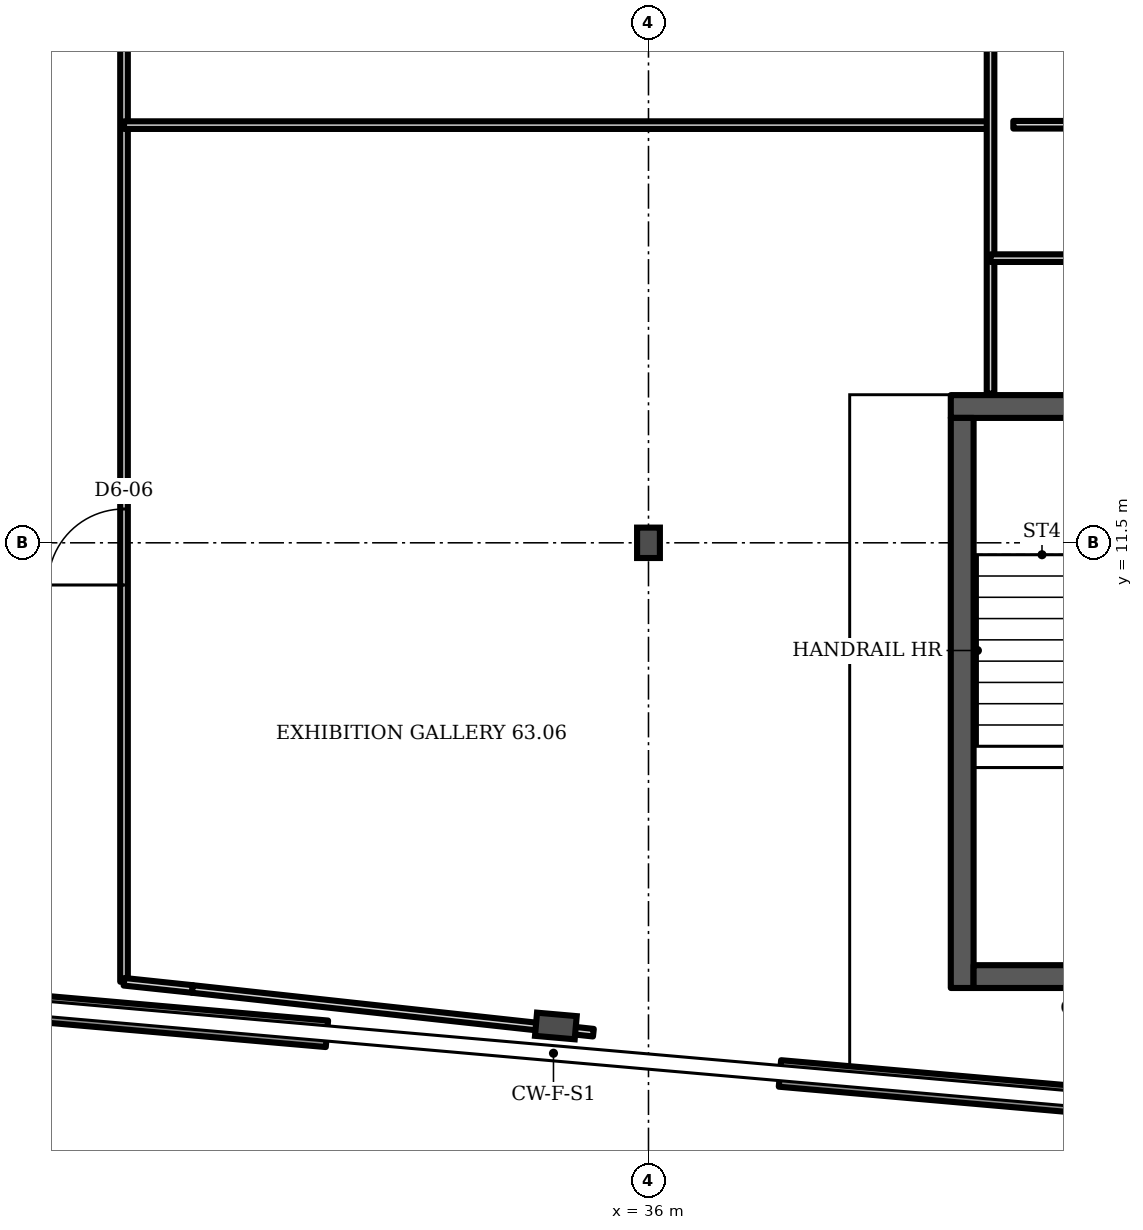
"""IFC4 building model, lengths in metres.
Left out: names, types, materials, properties, quantities, classifications, styles, units other than length and angle.
Written with IfcOpenShell. Run it as: python <this file> out.ifc"""

import sys

from ifc_helpers import new_model, si_unit, direction, frame, frame_2d, origin, origin_2d, place, context, subcontext, project, spatial, rectangle, i_section, extrude, element, fill, save


model = new_model("IFC4")
c1 = context("Model", 3, precision=1e-05, world=origin(), true_north=direction((0.0, 1.0)))
c2 = subcontext(c1, "Body", "Model", "MODEL_VIEW")
j1 = project(units=[si_unit("LENGTHUNIT", "METRE"), si_unit("PLANEANGLEUNIT", "RADIAN")], contexts=[c1])
p1 = place(None, origin())
s1 = spatial("IfcSite", under=j1, at=p1, CompositionType="ELEMENT")
p2 = place(p1, origin())
s2 = spatial("IfcBuilding", under=s1, at=p2, CompositionType="ELEMENT")
p3 = place(p2, frame((0.0, 0.0, 250.3)))
s3 = spatial("IfcBuildingStorey", under=s2, at=p3, CompositionType="ELEMENT", Elevation=250.3)
p4 = place(p3, frame((34.781, 5.143, 0.0), z_axis=(0.0, 0.0, 1.0), x_axis=(-0.087156, -0.996197, 0.0)))
e1 = element("IfcColumn", 1, at=p4, inside=s3, PredefinedType="COLUMN", context=c2, shape_type="SweptSolid", body=[
    extrude(i_section(OverallWidth=0.306, OverallDepth=0.524, WebThickness=0.021, FlangeThickness=0.04, FilletRadius=0.027, at=origin_2d()), origin(), (0.0, 0.0, 1.0), 3.6),
])
p5 = place(p3, frame((36.0, 11.5, 0.0), z_axis=(0.0, 0.0, 1.0), x_axis=(1.0, 0.0, 0.0)))
e2 = element("IfcColumn", 2, at=p5, inside=s3, PredefinedType="COLUMN", context=c2, shape_type="SweptSolid", body=[
    extrude(i_section(OverallWidth=0.3, OverallDepth=0.4, WebThickness=0.013, FlangeThickness=0.024, FilletRadius=0.027, at=origin_2d()), origin(), (0.0, 0.0, 1.0), 3.6),
])
p6 = place(p3, frame((25.929, 5.551, 0.0), z_axis=(0.0, 0.0, 1.0), x_axis=(0.996198, -0.08716, 0.0)))
e3 = element("IfcWall", 3, at=p6, inside=s3, PredefinedType="SOLIDWALL", context=c2, shape_type="SweptSolid", body=[
    extrude(rectangle(XDim=5.863, YDim=0.35, at=frame_2d((2.931, 0.0))), origin(), (0.0, 0.0, 1.0), 1.0),
])
p7 = place(p3, frame((37.729, 4.519, 0.0), z_axis=(0.0, 0.0, 1.0), x_axis=(0.99619, -0.087167, 0.0)))
e4 = element("IfcWall", 4, at=p7, inside=s3, PredefinedType="SOLIDWALL", context=c2, shape_type="SweptSolid", body=[
    extrude(rectangle(XDim=11.831, YDim=0.35, at=frame_2d((5.915, 0.0))), origin(), (0.0, 0.0, 1.0), 1.0),
])
p8 = place(p3, frame((39.977, 13.293, 0.0), z_axis=(0.0, 0.0, 1.0), x_axis=(1.0, 0.0, 0.0)))
e5 = element("IfcWall", 5, at=p8, inside=s3, PredefinedType="SHEAR", context=c2, shape_type="SweptSolid", body=[
    extrude(rectangle(XDim=4.35, YDim=0.3, at=frame_2d((2.175, 0.0))), origin(), (0.0, 0.0, 1.0), 3.2),
])
p9 = place(p8, frame((1.575, 0.0, 0.0)))
e6 = element("IfcOpeningElement", 6, at=p9, cuts=e5, PredefinedType="OPENING", context=c2, shape_type="SweptSolid", body=[
    extrude(rectangle(XDim=1.2, YDim=2.1, at=frame_2d((0.6, 1.05))), frame((0.0, 0.16, 0.0), z_axis=(0.0, -1.0, 0.0), x_axis=(1.0, 0.0, 0.0)), (0.0, 0.0, 1.0), 0.32),
])
p10 = place(p3, frame((29.1, 5.725, 0.0), z_axis=(0.0, 0.0, 1.0), x_axis=(0.0, 1.0, 0.0)))
e7 = element("IfcWall", 7, at=p10, inside=s3, PredefinedType="PARTITIONING", context=c2, shape_type="SweptSolid", body=[
    extrude(rectangle(XDim=24.775, YDim=0.1, at=frame_2d((12.387, 0.0))), origin(), (0.0, 0.0, 1.0), 3.2),
])
p11 = place(p10, frame((5.22, 0.0, 0.0)))
e8 = element("IfcOpeningElement", 8, at=p11, cuts=e7, PredefinedType="OPENING", context=c2, shape_type="SweptSolid", body=[
    extrude(rectangle(XDim=1.0, YDim=2.1, at=frame_2d((0.5, 1.05))), frame((0.0, 0.06, 0.0), z_axis=(0.0, -1.0, 0.0), x_axis=(1.0, 0.0, 0.0)), (0.0, 0.0, 1.0), 0.12),
])
p12 = place(p10, frame((17.095, 0.0, 0.0)))
e9 = element("IfcOpeningElement", 9, at=p12, cuts=e7, PredefinedType="OPENING", context=c2, shape_type="SweptSolid", body=[
    extrude(rectangle(XDim=1.8, YDim=2.1, at=frame_2d((0.9, 1.05))), frame((0.0, 0.06, 0.0), z_axis=(0.0, -1.0, 0.0), x_axis=(1.0, 0.0, 0.0)), (0.0, 0.0, 1.0), 0.12),
])
p13 = place(p3, frame((29.1, 16.995, 0.0), z_axis=(0.0, 0.0, 1.0), x_axis=(1.0, 0.0, 0.0)))
e10 = element("IfcWall", 10, at=p13, inside=s3, PredefinedType="PARTITIONING", context=c2, shape_type="SweptSolid", body=[
    extrude(rectangle(XDim=11.4, YDim=0.1, at=frame_2d((5.7, 0.0))), origin(), (0.0, 0.0, 1.0), 3.2),
])
p14 = place(p3, frame((30.0, 5.63, 0.0), z_axis=(0.0, 0.0, 1.0), x_axis=(-0.994445, 0.105218, 0.0)))
e11 = element("IfcWall", 11, at=p14, inside=s3, PredefinedType="PARTITIONING", context=c2, shape_type="SweptSolid", body=[
    extrude(rectangle(XDim=0.905, YDim=0.1, at=frame_2d((0.453, 0.0))), origin(), (0.0, 0.0, 1.0), 2.58),
])
p15 = place(p3, frame((35.275, 5.055, 0.0), z_axis=(0.0, 0.0, 1.0), x_axis=(-0.994115, 0.108356, 0.0)))
e12 = element("IfcWall", 12, at=p15, inside=s3, PredefinedType="PARTITIONING", context=c2, shape_type="SweptSolid", body=[
    extrude(rectangle(XDim=5.306, YDim=0.1, at=frame_2d((2.653, 0.0))), origin(), (0.0, 0.0, 1.0), 2.58),
])
p16 = place(p3, frame((40.5, 13.463, 0.0), z_axis=(0.0, 0.0, 1.0), x_axis=(0.0, 1.0, 0.0)))
e13 = element("IfcWall", 13, at=p16, inside=s3, PredefinedType="PARTITIONING", context=c2, shape_type="SweptSolid", body=[
    extrude(rectangle(XDim=17.037, YDim=0.1, at=frame_2d((8.519, 0.0))), origin(), (0.0, 0.0, 1.0), 3.2),
])
p17 = place(p3, frame((40.5, 15.245, 0.0), z_axis=(0.0, 0.0, 1.0), x_axis=(1.0, 0.0, 0.0)))
e14 = element("IfcWall", 14, at=p17, inside=s3, PredefinedType="PARTITIONING", context=c2, shape_type="SweptSolid", body=[
    extrude(rectangle(XDim=9.52, YDim=0.1, at=frame_2d((4.76, 0.0))), origin(), (0.0, 0.0, 1.0), 3.2),
])
p18 = place(p17, frame((8.125, 0.0, 0.0)))
e15 = element("IfcOpeningElement", 15, at=p18, cuts=e14, PredefinedType="OPENING", context=c2, shape_type="SweptSolid", body=[
    extrude(rectangle(XDim=1.0, YDim=2.1, at=frame_2d((0.5, 1.05))), frame((0.0, 0.06, 0.0), z_axis=(0.0, -1.0, 0.0), x_axis=(1.0, 0.0, 0.0)), (0.0, 0.0, 1.0), 0.12),
])
p19 = place(p3, frame((40.8, 17.0, 0.0), z_axis=(0.0, 0.0, 1.0), x_axis=(1.0, 0.0, 0.0)))
e16 = element("IfcWall", 16, at=p19, inside=s3, PredefinedType="PARTITIONING", context=c2, shape_type="SweptSolid", body=[
    extrude(rectangle(XDim=1.325, YDim=0.1, at=frame_2d((0.663, 0.0))), origin(), (0.0, 0.0, 1.0), 3.2),
])
p20 = place(p3, frame((40.127, 5.643, 0.0), z_axis=(0.0, 0.0, 1.0), x_axis=(0.0, 1.0, 0.0)))
e17 = element("IfcWall", 17, at=p20, inside=s3, PredefinedType="SHEAR", context=c2, shape_type="SweptSolid", body=[
    extrude(rectangle(XDim=7.5, YDim=0.3, at=frame_2d((3.75, 0.0))), origin(), (0.0, 0.0, 1.0), 3.2),
])
p21 = place(p3, frame((40.277, 5.793, 0.0), z_axis=(0.0, 0.0, 1.0), x_axis=(1.0, 0.0, 0.0)))
e18 = element("IfcWall", 18, at=p21, inside=s3, PredefinedType="SHEAR", context=c2, shape_type="SweptSolid", body=[
    extrude(rectangle(XDim=3.75, YDim=0.3, at=frame_2d((1.875, 0.0))), origin(), (0.0, 0.0, 1.0), 3.2),
])
p22 = place(p11, origin())
e19 = element("IfcDoor", 19, at=p22, inside=s3, OperationType="SINGLE_SWING_LEFT", PredefinedType="DOOR", context=c2, shape_type="SweptSolid", body=[
    extrude(rectangle(XDim=1.0, YDim=2.1, at=frame_2d((0.5, 1.05))), frame((0.0, 0.025, 0.0), z_axis=(0.0, -1.0, 0.0), x_axis=(1.0, 0.0, 0.0)), (0.0, 0.0, 1.0), 0.05),
])
fill(e8, e19)
save(model, sys.argv[1])
